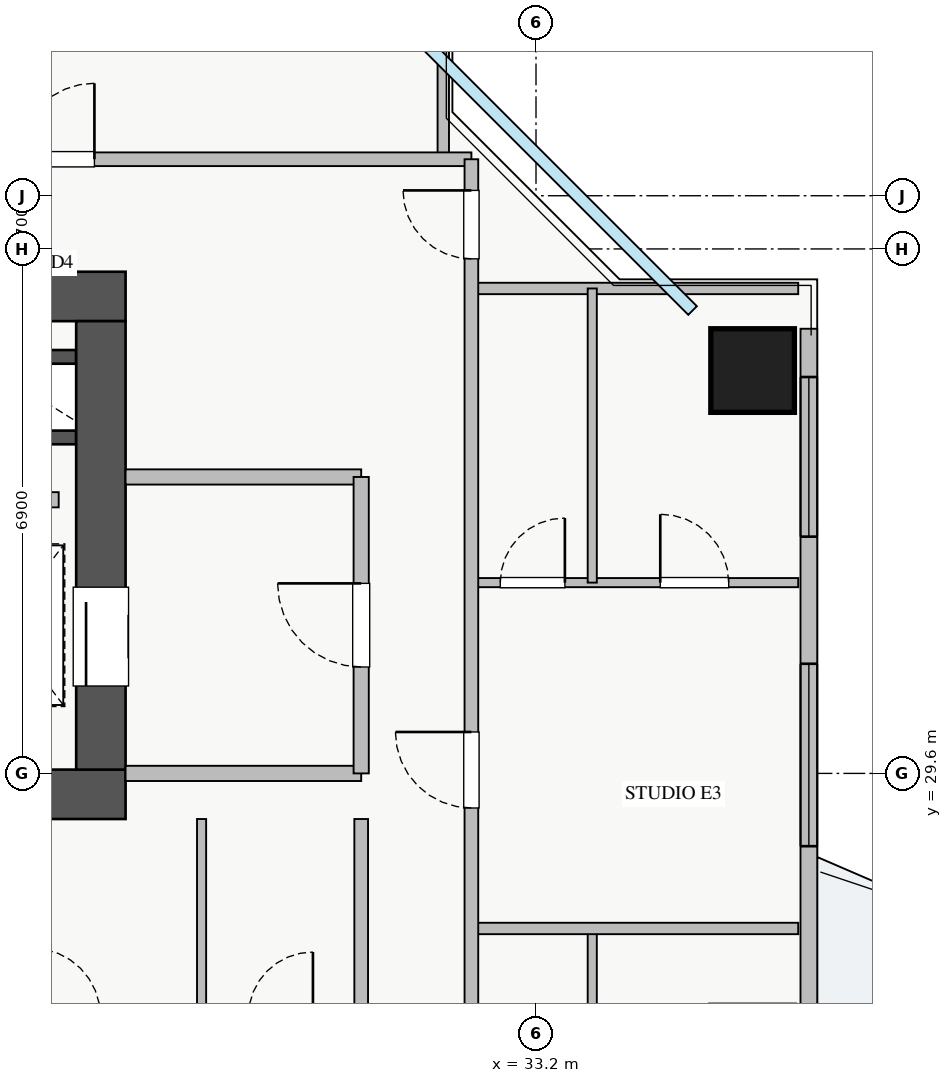
"""IFC4 building model, lengths in metres.
Left out: names, types, materials, properties, quantities, classifications, styles, units other than length and angle.
Written with IfcOpenShell. Run it as: python <this file> out.ifc"""

import sys

from ifc_helpers import new_model, si_unit, direction, frame, frame_2d, origin, origin_2d, place, context, subcontext, project, spatial, rectangle, extrude, source, transform, mapped, element, fill, save


model = new_model("IFC4")
c1 = context("Model", 3, precision=1e-05, world=origin(), true_north=direction((0.0, 1.0)))
c2 = subcontext(c1, "Body", "Model", "MODEL_VIEW")
j1 = project(units=[si_unit("LENGTHUNIT", "METRE"), si_unit("PLANEANGLEUNIT", "RADIAN")], contexts=[c1])
p1 = place(None, origin())
s1 = spatial("IfcSite", under=j1, at=p1, CompositionType="ELEMENT")
p2 = place(p1, origin())
s2 = spatial("IfcBuilding", under=s1, at=p2, CompositionType="ELEMENT")
p3 = place(p2, frame((0.0, 0.0, 126.25)))
s3 = spatial("IfcBuildingStorey", under=s2, at=p3, CompositionType="ELEMENT", Elevation=126.25)
for number, where, z_axis, x_axis in (
    (1, (25.8, 35.08, 0.0), (0.0, 0.0, 1.0), (1.0, 0.0, 0.0)),
    (2, (25.8, 34.02, 0.0), (0.0, 0.0, 1.0), (1.0, 0.0, 0.0)),
):
    element("IfcWall", number, at=place(p3, frame(where, z_axis=z_axis, x_axis=x_axis)), inside=s3, PredefinedType="SHEAR", context=c2, shape_type="SweptSolid", body=[
        extrude(rectangle(XDim=1.35, YDim=0.18, at=frame_2d((0.675, 0.0))), origin(), (0.0, 0.0, 1.0), 3.07),
    ])
p4 = place(p3, frame((10.2, 29.325, 0.0), z_axis=(0.0, 0.0, 1.0), x_axis=(1.0, 0.0, 0.0)))
e3 = element("IfcWall", 3, at=p4, inside=s3, PredefinedType="SHEAR", context=c2, shape_type="SweptSolid", body=[
    extrude(rectangle(XDim=17.6, YDim=0.65, at=frame_2d((8.8, 0.0))), origin(), (0.0, 0.0, 1.0), 3.25),
])
p5 = place(p3, frame((10.2, 35.875, 0.0), z_axis=(0.0, 0.0, 1.0), x_axis=(1.0, 0.0, 0.0)))
e4 = element("IfcWall", 4, at=p5, inside=s3, PredefinedType="SHEAR", context=c2, shape_type="SweptSolid", body=[
    extrude(rectangle(XDim=17.6, YDim=0.65, at=frame_2d((8.8, 0.0))), origin(), (0.0, 0.0, 1.0), 3.25),
])
p6 = place(p5, frame((1.15, 0.0, 0.0)))
e5 = element("IfcOpeningElement", 5, at=p6, cuts=e4, PredefinedType="OPENING", context=c2, shape_type="SweptSolid", body=[
    extrude(rectangle(XDim=1.1, YDim=2.05, at=frame_2d((0.55, 1.025))), frame((0.0, 0.335, 0.0), z_axis=(0.0, -1.0, 0.0), x_axis=(1.0, 0.0, 0.0)), (0.0, 0.0, 1.0), 0.67),
])
p7 = place(p5, frame((8.3, 0.0, 0.0)))
e6 = element("IfcOpeningElement", 6, at=p7, cuts=e4, PredefinedType="OPENING", context=c2, shape_type="SweptSolid", body=[
    extrude(rectangle(XDim=1.1, YDim=2.05, at=frame_2d((0.55, 1.025))), frame((0.0, 0.335, 0.0), z_axis=(0.0, -1.0, 0.0), x_axis=(1.0, 0.0, 0.0)), (0.0, 0.0, 1.0), 0.67),
])
p8 = place(p5, frame((4.9, 0.0, 0.0)))
e7 = element("IfcOpeningElement", 7, at=p8, cuts=e4, PredefinedType="OPENING", context=c2, shape_type="SweptSolid", body=[
    extrude(rectangle(XDim=1.1, YDim=2.05, at=frame_2d((0.55, 1.025))), frame((0.0, 0.335, 0.0), z_axis=(0.0, -1.0, 0.0), x_axis=(1.0, 0.0, 0.0)), (0.0, 0.0, 1.0), 0.67),
])
p9 = place(p5, frame((14.74, 0.0, 0.0)))
e8 = element("IfcOpeningElement", 8, at=p9, cuts=e4, PredefinedType="OPENING", context=c2, shape_type="SweptSolid", body=[
    extrude(rectangle(XDim=1.0, YDim=2.05, at=frame_2d((0.5, 1.025))), frame((0.0, 0.335, 0.0), z_axis=(0.0, -1.0, 0.0), x_axis=(1.0, 0.0, 0.0)), (0.0, 0.0, 1.0), 0.67),
])
p10 = place(p5, frame((10.175, 0.0, 0.0)))
e9 = element("IfcOpeningElement", 9, at=p10, cuts=e4, PredefinedType="OPENING", context=c2, shape_type="SweptSolid", body=[
    extrude(rectangle(XDim=1.0, YDim=2.05, at=frame_2d((0.5, 1.025))), frame((0.0, 0.335, 0.0), z_axis=(0.0, -1.0, 0.0), x_axis=(1.0, 0.0, 0.0)), (0.0, 0.0, 1.0), 0.67),
])
p11 = place(p5, frame((12.625, 0.0, 0.0)))
e10 = element("IfcOpeningElement", 10, at=p11, cuts=e4, PredefinedType="OPENING", context=c2, shape_type="SweptSolid", body=[
    extrude(rectangle(XDim=1.0, YDim=2.05, at=frame_2d((0.5, 1.025))), frame((0.0, 0.335, 0.0), z_axis=(0.0, -1.0, 0.0), x_axis=(1.0, 0.0, 0.0)), (0.0, 0.0, 1.0), 0.67),
])
p12 = place(p3, frame((27.475, 29.65, 0.0), z_axis=(0.0, 0.0, 1.0), x_axis=(0.0, 1.0, 0.0)))
e11 = element("IfcWall", 11, at=p12, inside=s3, PredefinedType="SHEAR", context=c2, shape_type="SweptSolid", body=[
    extrude(rectangle(XDim=5.9, YDim=0.65, at=frame_2d((2.95, 0.0))), origin(), (0.0, 0.0, 1.0), 3.25),
])
p13 = place(p12, frame((1.1, 0.0, 0.0)))
e12 = element("IfcOpeningElement", 12, at=p13, cuts=e11, PredefinedType="OPENING", context=c2, shape_type="SweptSolid", body=[
    extrude(rectangle(XDim=1.3, YDim=2.05, at=frame_2d((0.65, 1.025))), frame((0.0, 0.335, 0.0), z_axis=(0.0, -1.0, 0.0), x_axis=(1.0, 0.0, 0.0)), (0.0, 0.0, 1.0), 0.67),
])
m1 = source(origin(), c2, "Body", "SweptSolid", [
    extrude(rectangle(XDim=1.1, YDim=1.1, at=origin_2d()), origin(), (0.0, 0.0, 1.0), 3.25),
])
p14 = place(p3, frame((36.05, 34.9, 0.0), z_axis=(0.0, 0.0, 1.0), x_axis=(1.0, 0.0, 0.0)))
e13 = element("IfcColumn", 13, at=p14, inside=s3, PredefinedType="COLUMN", context=c2, shape_type="MappedRepresentation", body=[
    mapped(m1, transform((0.0, 0.0, 0.0), x_axis=(1.0, 0.0, 0.0), y_axis=(0.0, 1.0, 0.0), z_axis=(0.0, 0.0, 1.0), scale=1.0)),
])
p15 = place(p3, frame((36.79, 10.55, 0.0), z_axis=(0.0, 0.0, 1.0), x_axis=(0.0, 1.0, 0.0)))
e14 = element("IfcWall", 14, at=p15, inside=s3, PredefinedType="STANDARD", context=c2, shape_type="SweptSolid", body=[
    extrude(rectangle(XDim=24.9, YDim=0.22, at=frame_2d((12.45, 0.0))), origin(), (0.0, 0.0, 1.0), 2.61),
])
p16 = place(p15, frame((13.3, 0.0, 0.0)))
e15 = element("IfcOpeningElement", 15, at=p16, cuts=e14, PredefinedType="OPENING", context=c2, shape_type="SweptSolid", body=[
    extrude(rectangle(XDim=1.2, YDim=2.1, at=frame_2d((0.6, 1.05))), frame((0.0, 0.12, 0.0), z_axis=(0.0, -1.0, 0.0), x_axis=(1.0, 0.0, 0.0)), (0.0, 0.0, 1.0), 0.24),
])
p17 = place(p15, frame((1.912, 0.0, 0.9)))
e16 = element("IfcOpeningElement", 16, at=p17, cuts=e14, PredefinedType="OPENING", context=c2, shape_type="SweptSolid", body=[
    extrude(rectangle(XDim=2.4, YDim=1.48, at=frame_2d((1.2, 0.74))), frame((0.0, 0.12, 0.0), z_axis=(0.0, -1.0, 0.0), x_axis=(1.0, 0.0, 0.0)), (0.0, 0.0, 1.0), 0.24),
])
p18 = place(p15, frame((22.165, 0.0, 0.9)))
e17 = element("IfcOpeningElement", 17, at=p18, cuts=e14, PredefinedType="OPENING", context=c2, shape_type="SweptSolid", body=[
    extrude(rectangle(XDim=2.1, YDim=1.5, at=frame_2d((1.05, 0.75))), frame((0.0, 0.12, 0.0), z_axis=(0.0, -1.0, 0.0), x_axis=(1.0, 0.0, 0.0)), (0.0, 0.0, 1.0), 0.24),
])
p19 = place(p15, frame((18.093, 0.0, 0.9)))
e18 = element("IfcOpeningElement", 18, at=p19, cuts=e14, PredefinedType="OPENING", context=c2, shape_type="SweptSolid", body=[
    extrude(rectangle(XDim=2.4, YDim=1.5, at=frame_2d((1.2, 0.75))), frame((0.0, 0.12, 0.0), z_axis=(0.0, -1.0, 0.0), x_axis=(1.0, 0.0, 0.0)), (0.0, 0.0, 1.0), 0.24),
])
p20 = place(p15, frame((7.875, 0.0, 0.9)))
e19 = element("IfcOpeningElement", 19, at=p20, cuts=e14, PredefinedType="OPENING", context=c2, shape_type="SweptSolid", body=[
    extrude(rectangle(XDim=0.9, YDim=1.2, at=frame_2d((0.45, 0.6))), frame((0.0, 0.12, 0.0), z_axis=(0.0, -1.0, 0.0), x_axis=(1.0, 0.0, 0.0)), (0.0, 0.0, 1.0), 0.24),
])
for number, where, z_axis, x_axis in (
    (20, (27.8, 29.6, 0.0), (0.0, 0.0, 1.0), (1.0, 0.0, 0.0)),
    (21, (27.8, 33.5, 0.0), (0.0, 0.0, 1.0), (1.0, 0.0, 0.0)),
):
    element("IfcWall", number, at=place(p3, frame(where, z_axis=z_axis, x_axis=x_axis)), inside=s3, PredefinedType="PARTITIONING", context=c2, shape_type="SweptSolid", body=[
        extrude(rectangle(XDim=3.1, YDim=0.2, at=frame_2d((1.55, 0.0))), origin(), (0.0, 0.0, 1.0), 3.07),
    ])
p21 = place(p3, frame((30.9, 29.6, 0.0), z_axis=(0.0, 0.0, 1.0), x_axis=(0.0, 1.0, 0.0)))
e22 = element("IfcWall", 22, at=p21, inside=s3, PredefinedType="PARTITIONING", context=c2, shape_type="SweptSolid", body=[
    extrude(rectangle(XDim=3.9, YDim=0.2, at=frame_2d((1.95, 0.0))), origin(), (0.0, 0.0, 1.0), 3.07),
])
p22 = place(p21, frame((1.4, 0.0, 0.0)))
e23 = element("IfcOpeningElement", 23, at=p22, cuts=e22, PredefinedType="OPENING", context=c2, shape_type="SweptSolid", body=[
    extrude(rectangle(XDim=1.1, YDim=2.05, at=frame_2d((0.55, 1.025))), frame((0.0, 0.11, 0.0), z_axis=(0.0, -1.0, 0.0), x_axis=(1.0, 0.0, 0.0)), (0.0, 0.0, 1.0), 0.22),
])
p23 = place(p3, frame((21.75, 33.2, 0.0), z_axis=(0.0, 0.0, 1.0), x_axis=(1.0, 0.0, 0.0)))
e24 = element("IfcWall", 24, at=p23, inside=s3, PredefinedType="PARTITIONING", context=c2, shape_type="SweptSolid", body=[
    extrude(rectangle(XDim=5.17, YDim=0.2, at=frame_2d((2.585, 0.0))), origin(), (0.0, 0.0, 1.0), 3.07),
])
p24 = place(p3, frame((31.98, 37.68, 0.0), z_axis=(0.0, 0.0, 1.0), x_axis=(0.0, 1.0, 0.0)))
e25 = element("IfcWall", 25, at=p24, inside=s3, PredefinedType="PARTITIONING", context=c2, shape_type="SweptSolid", body=[
    extrude(rectangle(XDim=2.97, YDim=0.15, at=frame_2d((1.485, 0.0))), origin(), (0.0, 0.0, 1.0), 3.07),
])
p25 = place(p3, frame((8.72, 37.68, 0.0), z_axis=(0.0, 0.0, 1.0), x_axis=(1.0, 0.0, 0.0)))
e26 = element("IfcWall", 26, at=p25, inside=s3, PredefinedType="PARTITIONING", context=c2, shape_type="SweptSolid", body=[
    extrude(rectangle(XDim=23.63, YDim=0.18, at=frame_2d((11.815, 0.0))), origin(), (0.0, 0.0, 1.0), 3.07),
])
p26 = place(p25, frame((6.04, 0.0, 0.0)))
e27 = element("IfcOpeningElement", 27, at=p26, cuts=e26, PredefinedType="OPENING", context=c2, shape_type="SweptSolid", body=[
    extrude(rectangle(XDim=1.0, YDim=2.05, at=frame_2d((0.5, 1.025))), frame((0.0, 0.1, 0.0), z_axis=(0.0, -1.0, 0.0), x_axis=(1.0, 0.0, 0.0)), (0.0, 0.0, 1.0), 0.2),
])
p27 = place(p25, frame((17.67, 0.0, 0.0)))
e28 = element("IfcOpeningElement", 28, at=p27, cuts=e26, PredefinedType="OPENING", context=c2, shape_type="SweptSolid", body=[
    extrude(rectangle(XDim=1.0, YDim=2.05, at=frame_2d((0.5, 1.025))), frame((0.0, 0.1, 0.0), z_axis=(0.0, -1.0, 0.0), x_axis=(1.0, 0.0, 0.0)), (0.0, 0.0, 1.0), 0.2),
])
p28 = place(p3, frame((32.35, 35.98, 0.0), z_axis=(0.0, 0.0, 1.0), x_axis=(1.0, 0.0, 0.0)))
e29 = element("IfcWall", 29, at=p28, inside=s3, PredefinedType="PARTITIONING", context=c2, shape_type="SweptSolid", body=[
    extrude(rectangle(XDim=4.3, YDim=0.15, at=frame_2d((2.15, 0.0))), origin(), (0.0, 0.0, 1.0), 3.07),
])
p29 = place(p3, frame((33.94, 23.1, 0.0), z_axis=(0.0, 0.0, 1.0), x_axis=(0.0, 1.0, 0.0)))
e30 = element("IfcWall", 30, at=p29, inside=s3, PredefinedType="PLUMBINGWALL", context=c2, shape_type="SweptSolid", body=[
    extrude(rectangle(XDim=4.46, YDim=0.12, at=frame_2d((2.23, 0.0))), origin(), (0.0, 0.0, 1.0), 3.07),
])
p30 = place(p3, frame((32.35, 32.11, 0.0), z_axis=(0.0, 0.0, 1.0), x_axis=(1.0, 0.0, 0.0)))
e31 = element("IfcWall", 31, at=p30, inside=s3, PredefinedType="PLUMBINGWALL", context=c2, shape_type="SweptSolid", body=[
    extrude(rectangle(XDim=4.3, YDim=0.12, at=frame_2d((2.15, 0.0))), origin(), (0.0, 0.0, 1.0), 3.07),
])
p31 = place(p30, frame((0.38, 0.0, 0.0)))
e32 = element("IfcOpeningElement", 32, at=p31, cuts=e31, PredefinedType="OPENING", context=c2, shape_type="SweptSolid", body=[
    extrude(rectangle(XDim=0.85, YDim=2.05, at=frame_2d((0.425, 1.025))), frame((0.0, 0.07, 0.0), z_axis=(0.0, -1.0, 0.0), x_axis=(1.0, 0.0, 0.0)), (0.0, 0.0, 1.0), 0.14),
])
p32 = place(p30, frame((2.485, 0.0, 0.0)))
e33 = element("IfcOpeningElement", 33, at=p32, cuts=e31, PredefinedType="OPENING", context=c2, shape_type="SweptSolid", body=[
    extrude(rectangle(XDim=0.9, YDim=2.05, at=frame_2d((0.45, 1.025))), frame((0.0, 0.07, 0.0), z_axis=(0.0, -1.0, 0.0), x_axis=(1.0, 0.0, 0.0)), (0.0, 0.0, 1.0), 0.14),
])
p33 = place(p3, frame((33.94, 32.11, 0.0), z_axis=(0.0, 0.0, 1.0), x_axis=(0.0, 1.0, 0.0)))
e34 = element("IfcWall", 34, at=p33, inside=s3, PredefinedType="PLUMBINGWALL", context=c2, shape_type="SweptSolid", body=[
    extrude(rectangle(XDim=3.87, YDim=0.12, at=frame_2d((1.935, 0.0))), origin(), (0.0, 0.0, 1.0), 3.07),
])
p34 = place(p3, frame((32.35, 27.56, 0.0), z_axis=(0.0, 0.0, 1.0), x_axis=(1.0, 0.0, 0.0)))
e35 = element("IfcWall", 35, at=p34, inside=s3, PredefinedType="PARTITIONING", context=c2, shape_type="SweptSolid", body=[
    extrude(rectangle(XDim=4.3, YDim=0.15, at=frame_2d((2.15, 0.0))), origin(), (0.0, 0.0, 1.0), 3.07),
])
p35 = place(p3, frame((32.35, 8.31, 0.0), z_axis=(0.0, 0.0, 1.0), x_axis=(0.0, 1.0, 0.0)))
e36 = element("IfcWall", 36, at=p35, inside=s3, PredefinedType="PARTITIONING", context=c2, shape_type="SweptSolid", body=[
    extrude(rectangle(XDim=29.37, YDim=0.18, at=frame_2d((14.685, 0.0))), origin(), (0.0, 0.0, 1.0), 3.07),
])
p36 = place(p35, frame((28.06, 0.0, 0.0)))
e37 = element("IfcOpeningElement", 37, at=p36, cuts=e36, PredefinedType="OPENING", context=c2, shape_type="SweptSolid", body=[
    extrude(rectangle(XDim=0.9, YDim=2.05, at=frame_2d((0.45, 1.025))), frame((0.0, 0.1, 0.0), z_axis=(0.0, -1.0, 0.0), x_axis=(1.0, 0.0, 0.0)), (0.0, 0.0, 1.0), 0.2),
])
p37 = place(p35, frame((0.415, 0.0, 0.0)))
e38 = element("IfcOpeningElement", 38, at=p37, cuts=e36, PredefinedType="OPENING", context=c2, shape_type="SweptSolid", body=[
    extrude(rectangle(XDim=0.9, YDim=2.05, at=frame_2d((0.45, 1.025))), frame((0.0, 0.1, 0.0), z_axis=(0.0, -1.0, 0.0), x_axis=(1.0, 0.0, 0.0)), (0.0, 0.0, 1.0), 0.2),
])
p38 = place(p35, frame((5.295, 0.0, 0.0)))
e39 = element("IfcOpeningElement", 39, at=p38, cuts=e36, PredefinedType="OPENING", context=c2, shape_type="SweptSolid", body=[
    extrude(rectangle(XDim=1.0, YDim=2.05, at=frame_2d((0.5, 1.025))), frame((0.0, 0.1, 0.0), z_axis=(0.0, -1.0, 0.0), x_axis=(1.0, 0.0, 0.0)), (0.0, 0.0, 1.0), 0.2),
])
p39 = place(p35, frame((11.645, 0.0, 0.0)))
e40 = element("IfcOpeningElement", 40, at=p39, cuts=e36, PredefinedType="OPENING", context=c2, shape_type="SweptSolid", body=[
    extrude(rectangle(XDim=1.0, YDim=2.05, at=frame_2d((0.5, 1.025))), frame((0.0, 0.1, 0.0), z_axis=(0.0, -1.0, 0.0), x_axis=(1.0, 0.0, 0.0)), (0.0, 0.0, 1.0), 0.2),
])
p40 = place(p35, frame((20.835, 0.0, 0.0)))
e41 = element("IfcOpeningElement", 41, at=p40, cuts=e36, PredefinedType="OPENING", context=c2, shape_type="SweptSolid", body=[
    extrude(rectangle(XDim=1.0, YDim=2.05, at=frame_2d((0.5, 1.025))), frame((0.0, 0.1, 0.0), z_axis=(0.0, -1.0, 0.0), x_axis=(1.0, 0.0, 0.0)), (0.0, 0.0, 1.0), 0.2),
])
p41 = place(p3, frame((28.8, 26.4, 0.0), z_axis=(0.0, 0.0, 1.0), x_axis=(0.0, 1.0, 0.0)))
e42 = element("IfcWall", 42, at=p41, inside=s3, PredefinedType="PLUMBINGWALL", context=c2, shape_type="SweptSolid", body=[
    extrude(rectangle(XDim=2.6, YDim=0.12, at=frame_2d((1.3, 0.0))), origin(), (0.0, 0.0, 1.0), 3.07),
])
p42 = place(p3, frame((30.9, 17.0, 0.0), z_axis=(0.0, 0.0, 1.0), x_axis=(0.0, 1.0, 0.0)))
e43 = element("IfcWall", 43, at=p42, inside=s3, PredefinedType="PARTITIONING", context=c2, shape_type="SweptSolid", body=[
    extrude(rectangle(XDim=12.0, YDim=0.18, at=frame_2d((6.0, 0.0))), origin(), (0.0, 0.0, 1.0), 3.07),
])
p43 = place(p42, frame((1.025, 0.0, 0.0)))
e44 = element("IfcOpeningElement", 44, at=p43, cuts=e43, PredefinedType="OPENING", context=c2, shape_type="SweptSolid", body=[
    extrude(rectangle(XDim=1.0, YDim=2.05, at=frame_2d((0.5, 1.025))), frame((0.0, 0.1, 0.0), z_axis=(0.0, -1.0, 0.0), x_axis=(1.0, 0.0, 0.0)), (0.0, 0.0, 1.0), 0.2),
])
p44 = place(p42, frame((7.185, 0.0, 0.0)))
e45 = element("IfcOpeningElement", 45, at=p44, cuts=e43, PredefinedType="OPENING", context=c2, shape_type="SweptSolid", body=[
    extrude(rectangle(XDim=1.0, YDim=2.05, at=frame_2d((0.5, 1.025))), frame((0.0, 0.1, 0.0), z_axis=(0.0, -1.0, 0.0), x_axis=(1.0, 0.0, 0.0)), (0.0, 0.0, 1.0), 0.2),
])
m2 = source(origin(), c2, "Body", "SweptSolid", [
    extrude(rectangle(XDim=2.1, YDim=1.5, at=frame_2d((1.05, 0.75))), frame((0.0, 0.03, 0.0), z_axis=(0.0, -1.0, 0.0), x_axis=(1.0, 0.0, 0.0)), (0.0, 0.0, 1.0), 0.06),
])
p45 = place(p18, origin())
e46 = element("IfcWindow", 46, at=p45, inside=s3, PartitioningType="TRIPLE_PANEL_VERTICAL", PredefinedType="WINDOW", context=c2, shape_type="MappedRepresentation", body=[
    mapped(m2, transform((0.0, 0.0, 0.0), x_axis=(1.0, 0.0, 0.0), y_axis=(0.0, 1.0, 0.0), z_axis=(0.0, 0.0, 1.0), scale=1.0)),
])
fill(e17, e46)
m3 = source(origin(), c2, "Body", "SweptSolid", [
    extrude(rectangle(XDim=1.3, YDim=2.05, at=frame_2d((0.65, 1.025))), frame((0.0, 0.025, 0.0), z_axis=(0.0, -1.0, 0.0), x_axis=(1.0, 0.0, 0.0)), (0.0, 0.0, 1.0), 0.05),
])
p46 = place(p13, origin())
e47 = element("IfcDoor", 47, at=p46, inside=s3, OperationType="SLIDING_TO_LEFT", PredefinedType="DOOR", context=c2, shape_type="MappedRepresentation", body=[
    mapped(m3, transform((0.0, 0.0, 0.0), x_axis=(1.0, 0.0, 0.0), y_axis=(0.0, 1.0, 0.0), z_axis=(0.0, 0.0, 1.0), scale=1.0)),
])
fill(e12, e47)
m4 = source(origin(), c2, "Body", "SweptSolid", [
    extrude(rectangle(XDim=1.1, YDim=2.05, at=frame_2d((0.55, 1.025))), frame((0.0, 0.025, 0.0), z_axis=(0.0, -1.0, 0.0), x_axis=(1.0, 0.0, 0.0)), (0.0, 0.0, 1.0), 0.05),
])
p47 = place(p22, origin())
e48 = element("IfcDoor", 48, at=p47, inside=s3, OperationType="SINGLE_SWING_RIGHT", PredefinedType="DOOR", context=c2, shape_type="MappedRepresentation", body=[
    mapped(m4, transform((0.0, 0.0, 0.0), x_axis=(1.0, 0.0, 0.0), y_axis=(0.0, 1.0, 0.0), z_axis=(0.0, 0.0, 1.0), scale=1.0)),
])
fill(e23, e48)
m5 = source(origin(), c2, "Body", "SweptSolid", [
    extrude(rectangle(XDim=1.0, YDim=2.05, at=frame_2d((0.5, 1.025))), frame((0.0, 0.025, 0.0), z_axis=(0.0, -1.0, 0.0), x_axis=(1.0, 0.0, 0.0)), (0.0, 0.0, 1.0), 0.05),
])
p48 = place(p27, origin())
e49 = element("IfcDoor", 49, at=p48, inside=s3, OperationType="SINGLE_SWING_RIGHT", PredefinedType="DOOR", context=c2, shape_type="MappedRepresentation", body=[
    mapped(m5, transform((0.0, 0.0, 0.0), x_axis=(1.0, 0.0, 0.0), y_axis=(0.0, 1.0, 0.0), z_axis=(0.0, 0.0, 1.0), scale=1.0)),
])
fill(e28, e49)
m6 = source(origin(), c2, "Body", "SweptSolid", [
    extrude(rectangle(XDim=0.85, YDim=2.05, at=frame_2d((0.425, 1.025))), frame((0.0, 0.025, 0.0), z_axis=(0.0, -1.0, 0.0), x_axis=(1.0, 0.0, 0.0)), (0.0, 0.0, 1.0), 0.05),
])
p49 = place(p31, origin())
e50 = element("IfcDoor", 50, at=p49, inside=s3, OperationType="SINGLE_SWING_RIGHT", PredefinedType="DOOR", context=c2, shape_type="MappedRepresentation", body=[
    mapped(m6, transform((0.0, 0.0, 0.0), x_axis=(1.0, 0.0, 0.0), y_axis=(0.0, 1.0, 0.0), z_axis=(0.0, 0.0, 1.0), scale=1.0)),
])
fill(e32, e50)
m7 = source(origin(), c2, "Body", "SweptSolid", [
    extrude(rectangle(XDim=0.9, YDim=2.05, at=frame_2d((0.45, 1.025))), frame((0.0, 0.025, 0.0), z_axis=(0.0, -1.0, 0.0), x_axis=(1.0, 0.0, 0.0)), (0.0, 0.0, 1.0), 0.05),
])
p50 = place(p32, origin())
e51 = element("IfcDoor", 51, at=p50, inside=s3, OperationType="SINGLE_SWING_LEFT", PredefinedType="DOOR", context=c2, shape_type="MappedRepresentation", body=[
    mapped(m7, transform((0.0, 0.0, 0.0), x_axis=(1.0, 0.0, 0.0), y_axis=(0.0, 1.0, 0.0), z_axis=(0.0, 0.0, 1.0), scale=1.0)),
])
fill(e33, e51)
p51 = place(p36, origin())
e52 = element("IfcDoor", 52, at=p51, inside=s3, OperationType="SINGLE_SWING_RIGHT", PredefinedType="DOOR", context=c2, shape_type="MappedRepresentation", body=[
    mapped(m7, transform((0.0, 0.0, 0.0), x_axis=(1.0, 0.0, 0.0), y_axis=(0.0, 1.0, 0.0), z_axis=(0.0, 0.0, 1.0), scale=1.0)),
])
fill(e37, e52)
p52 = place(p40, origin())
e53 = element("IfcDoor", 53, at=p52, inside=s3, OperationType="SINGLE_SWING_RIGHT", PredefinedType="DOOR", context=c2, shape_type="MappedRepresentation", body=[
    mapped(m5, transform((0.0, 0.0, 0.0), x_axis=(1.0, 0.0, 0.0), y_axis=(0.0, 1.0, 0.0), z_axis=(0.0, 0.0, 1.0), scale=1.0)),
])
fill(e41, e53)
m8 = source(origin(), c2, "Body", "SweptSolid", [
    extrude(rectangle(XDim=2.4, YDim=1.5, at=frame_2d((1.2, 0.75))), frame((0.0, 0.03, 0.0), z_axis=(0.0, -1.0, 0.0), x_axis=(1.0, 0.0, 0.0)), (0.0, 0.0, 1.0), 0.06),
])
p53 = place(p19, origin())
e54 = element("IfcWindow", 54, at=p53, inside=s3, PartitioningType="TRIPLE_PANEL_VERTICAL", PredefinedType="WINDOW", context=c2, shape_type="MappedRepresentation", body=[
    mapped(m8, transform((0.0, 0.0, 0.0), x_axis=(1.0, 0.0, 0.0), y_axis=(0.0, 1.0, 0.0), z_axis=(0.0, 0.0, 1.0), scale=1.0)),
])
fill(e18, e54)
save(model, sys.argv[1])
